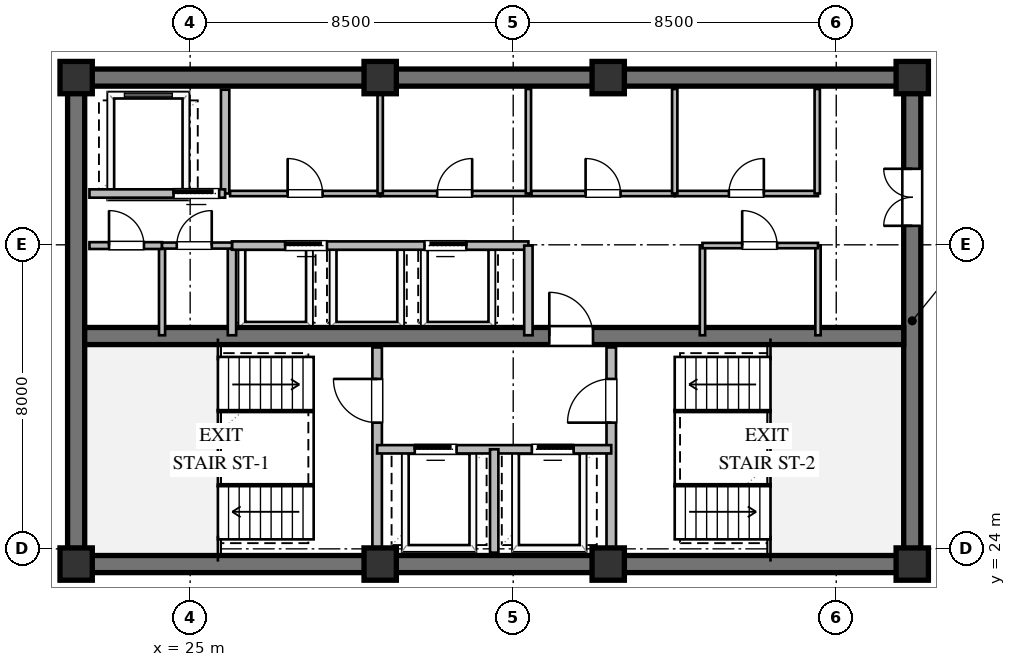
"""IFC4 building model, lengths in metres.
Left out: names, types, materials, properties, quantities, classifications, styles, units other than length and angle.
Written with IfcOpenShell. Run it as: python <this file> out.ifc"""

import sys

from ifc_helpers import new_model, si_unit, direction, frame, frame_2d, origin, origin_2d, place, context, subcontext, project, spatial, rectangle, extrude, element, fill, save


model = new_model("IFC4")
c1 = context("Model", 3, precision=1e-05, world=origin(), true_north=direction((0.0, 1.0)))
c2 = subcontext(c1, "Body", "Model", "MODEL_VIEW")
j1 = project(units=[si_unit("LENGTHUNIT", "METRE"), si_unit("PLANEANGLEUNIT", "RADIAN")], contexts=[c1])
p1 = place(None, origin())
s1 = spatial("IfcSite", under=j1, at=p1, CompositionType="ELEMENT")
p2 = place(p1, origin())
s2 = spatial("IfcBuilding", under=s1, at=p2, CompositionType="ELEMENT")
p3 = place(p2, frame((0.0, 0.0, 217.2)))
s3 = spatial("IfcBuildingStorey", under=s2, at=p3, CompositionType="ELEMENT", Elevation=217.2)
for number, where, z_axis, x_axis in (
    (1, (21.775, 23.6, 0.0), (0.0, 0.0, 1.0), (1.0, 0.0, 0.0)),
    (2, (21.775, 36.4, 0.0), (0.0, 0.0, 1.0), (1.0, 0.0, 0.0)),
):
    element("IfcWall", number, at=place(p3, frame(where, z_axis=z_axis, x_axis=x_axis)), inside=s3, PredefinedType="SHEAR", context=c2, shape_type="SweptSolid", body=[
        extrude(rectangle(XDim=22.45, YDim=0.45, at=frame_2d((11.225, 0.0))), origin(), (0.0, 0.0, 1.0), 3.36),
    ])
p4 = place(p3, frame((22.0, 23.825, 0.0), z_axis=(0.0, 0.0, 1.0), x_axis=(0.0, 1.0, 0.0)))
e3 = element("IfcWall", 3, at=p4, inside=s3, PredefinedType="SHEAR", context=c2, shape_type="SweptSolid", body=[
    extrude(rectangle(XDim=12.35, YDim=0.45, at=frame_2d((6.175, 0.0))), origin(), (0.0, 0.0, 1.0), 3.36),
])
p5 = place(p3, frame((44.0, 23.825, 0.0), z_axis=(0.0, 0.0, 1.0), x_axis=(0.0, 1.0, 0.0)))
e4 = element("IfcWall", 4, at=p5, inside=s3, PredefinedType="SHEAR", context=c2, shape_type="SweptSolid", body=[
    extrude(rectangle(XDim=12.35, YDim=0.45, at=frame_2d((6.175, 0.0))), origin(), (0.0, 0.0, 1.0), 3.36),
])
p6 = place(p5, frame((8.675, 0.0, 0.0)))
e5 = element("IfcOpeningElement", 5, at=p6, cuts=e4, PredefinedType="OPENING", context=c2, shape_type="SweptSolid", body=[
    extrude(rectangle(XDim=1.5, YDim=2.15, at=frame_2d((0.75, 1.075))), frame((0.0, 0.235, 0.0), z_axis=(0.0, -1.0, 0.0), x_axis=(1.0, 0.0, 0.0)), (0.0, 0.0, 1.0), 0.47),
])
p7 = place(p3, frame((22.225, 29.6, 0.0), z_axis=(0.0, 0.0, 1.0), x_axis=(1.0, 0.0, 0.0)))
e6 = element("IfcWall", 6, at=p7, inside=s3, PredefinedType="SHEAR", context=c2, shape_type="SweptSolid", body=[
    extrude(rectangle(XDim=21.55, YDim=0.45, at=frame_2d((10.775, 0.0))), origin(), (0.0, 0.0, 1.0), 3.36),
])
p8 = place(p7, frame((12.225, 0.0, 0.0)))
e7 = element("IfcOpeningElement", 7, at=p8, cuts=e6, PredefinedType="OPENING", context=c2, shape_type="SweptSolid", body=[
    extrude(rectangle(XDim=1.15, YDim=2.1, at=frame_2d((0.575, 1.05))), frame((0.0, 0.235, 0.0), z_axis=(0.0, -1.0, 0.0), x_axis=(1.0, 0.0, 0.0)), (0.0, 0.0, 1.0), 0.47),
])
for number, where, z_axis, x_axis in (
    (8, (22.0, 23.6, 0.0), (0.0, 0.0, 1.0), (1.0, 0.0, 0.0)),
    (9, (30.0, 23.6, 0.0), (0.0, 0.0, 1.0), (1.0, 0.0, 0.0)),
    (10, (36.0, 23.6, 0.0), (0.0, 0.0, 1.0), (1.0, 0.0, 0.0)),
    (11, (44.0, 23.6, 0.0), (0.0, 0.0, 1.0), (1.0, 0.0, 0.0)),
    (12, (44.0, 36.4, 0.0), (0.0, 0.0, 1.0), (1.0, 0.0, 0.0)),
    (13, (36.0, 36.4, 0.0), (0.0, 0.0, 1.0), (1.0, 0.0, 0.0)),
    (14, (30.0, 36.4, 0.0), (0.0, 0.0, 1.0), (1.0, 0.0, 0.0)),
    (15, (22.0, 36.4, 0.0), (0.0, 0.0, 1.0), (1.0, 0.0, 0.0)),
):
    element("IfcColumn", number, at=place(p3, frame(where, z_axis=z_axis, x_axis=x_axis)), inside=s3, PredefinedType="COLUMN", context=c2, shape_type="SweptSolid", body=[
        extrude(rectangle(XDim=0.85, YDim=0.85, at=origin_2d()), origin(), (0.0, 0.0, 1.0), 3.6),
    ])
p9 = place(p3, frame((29.92, 23.9, 0.0), z_axis=(0.0, 0.0, 1.0), x_axis=(0.0, 1.0, 0.0)))
e16 = element("IfcWall", 16, at=p9, inside=s3, PredefinedType="SOLIDWALL", context=c2, shape_type="SweptSolid", body=[
    extrude(rectangle(XDim=5.4, YDim=0.25, at=frame_2d((2.7, 0.0))), origin(), (0.0, 0.0, 1.0), 3.36),
])
p10 = place(p9, frame((3.421, 0.0, 0.0)))
e17 = element("IfcOpeningElement", 17, at=p10, cuts=e16, PredefinedType="OPENING", context=c2, shape_type="SweptSolid", body=[
    extrude(rectangle(XDim=1.15, YDim=2.1, at=frame_2d((0.575, 1.05))), frame((0.0, 0.135, 0.0), z_axis=(0.0, -1.0, 0.0), x_axis=(1.0, 0.0, 0.0)), (0.0, 0.0, 1.0), 0.27),
])
p11 = place(p3, frame((36.08, 23.9, 0.0), z_axis=(0.0, 0.0, 1.0), x_axis=(0.0, 1.0, 0.0)))
e18 = element("IfcWall", 18, at=p11, inside=s3, PredefinedType="SOLIDWALL", context=c2, shape_type="SweptSolid", body=[
    extrude(rectangle(XDim=5.4, YDim=0.25, at=frame_2d((2.7, 0.0))), origin(), (0.0, 0.0, 1.0), 3.36),
])
p12 = place(p11, frame((3.421, 0.0, 0.0)))
e19 = element("IfcOpeningElement", 19, at=p12, cuts=e18, PredefinedType="OPENING", context=c2, shape_type="SweptSolid", body=[
    extrude(rectangle(XDim=1.15, YDim=2.1, at=frame_2d((0.575, 1.05))), frame((0.0, 0.135, 0.0), z_axis=(0.0, -1.0, 0.0), x_axis=(1.0, 0.0, 0.0)), (0.0, 0.0, 1.0), 0.27),
])
p13 = place(p3, frame((29.92, 26.62, 0.0), z_axis=(0.0, 0.0, 1.0), x_axis=(1.0, 0.0, 0.0)))
e20 = element("IfcWall", 20, at=p13, inside=s3, PredefinedType="SOLIDWALL", context=c2, shape_type="SweptSolid", body=[
    extrude(rectangle(XDim=6.16, YDim=0.22, at=frame_2d((3.08, 0.0))), origin(), (0.0, 0.0, 1.0), 3.36),
])
p14 = place(p13, frame((0.99, 0.0, 0.0)))
e21 = element("IfcOpeningElement", 21, at=p14, cuts=e20, PredefinedType="OPENING", context=c2, shape_type="SweptSolid", body=[
    extrude(rectangle(XDim=1.1, YDim=2.1, at=frame_2d((0.55, 1.05))), frame((0.0, 0.12, 0.0), z_axis=(0.0, -1.0, 0.0), x_axis=(1.0, 0.0, 0.0)), (0.0, 0.0, 1.0), 0.24),
])
p15 = place(p13, frame((4.07, 0.0, 0.0)))
e22 = element("IfcOpeningElement", 22, at=p15, cuts=e20, PredefinedType="OPENING", context=c2, shape_type="SweptSolid", body=[
    extrude(rectangle(XDim=1.1, YDim=2.1, at=frame_2d((0.55, 1.05))), frame((0.0, 0.12, 0.0), z_axis=(0.0, -1.0, 0.0), x_axis=(1.0, 0.0, 0.0)), (0.0, 0.0, 1.0), 0.24),
])
p16 = place(p3, frame((33.0, 23.9, 0.0), z_axis=(0.0, 0.0, 1.0), x_axis=(0.0, 1.0, 0.0)))
e23 = element("IfcWall", 23, at=p16, inside=s3, PredefinedType="SOLIDWALL", context=c2, shape_type="SweptSolid", body=[
    extrude(rectangle(XDim=2.72, YDim=0.22, at=frame_2d((1.36, 0.0))), origin(), (0.0, 0.0, 1.0), 3.36),
])
p17 = place(p3, frame((25.92, 33.35, 0.0), z_axis=(0.0, 0.0, 1.0), x_axis=(0.0, 1.0, 0.0)))
e24 = element("IfcWall", 24, at=p17, inside=s3, PredefinedType="SOLIDWALL", context=c2, shape_type="SweptSolid", body=[
    extrude(rectangle(XDim=2.73, YDim=0.22, at=frame_2d((1.365, 0.0))), origin(), (0.0, 0.0, 1.0), 3.36),
])
p18 = place(p3, frame((22.35, 33.35, 0.0), z_axis=(0.0, 0.0, 1.0), x_axis=(1.0, 0.0, 0.0)))
e25 = element("IfcWall", 25, at=p18, inside=s3, PredefinedType="SOLIDWALL", context=c2, shape_type="SweptSolid", body=[
    extrude(rectangle(XDim=3.57, YDim=0.22, at=frame_2d((1.785, 0.0))), origin(), (0.0, 0.0, 1.0), 3.36),
])
p19 = place(p18, frame((2.213, 0.0, 0.0)))
e26 = element("IfcOpeningElement", 26, at=p19, cuts=e25, PredefinedType="OPENING", context=c2, shape_type="SweptSolid", body=[
    extrude(rectangle(XDim=1.2, YDim=2.1, at=frame_2d((0.6, 1.05))), frame((0.0, 0.12, 0.0), z_axis=(0.0, -1.0, 0.0), x_axis=(1.0, 0.0, 0.0)), (0.0, 0.0, 1.0), 0.24),
])
p20 = place(p3, frame((26.1, 29.62, 0.0), z_axis=(0.0, 0.0, 1.0), x_axis=(0.0, 1.0, 0.0)))
e27 = element("IfcWall", 27, at=p20, inside=s3, PredefinedType="SOLIDWALL", context=c2, shape_type="SweptSolid", body=[
    extrude(rectangle(XDim=2.36, YDim=0.22, at=frame_2d((1.18, 0.0))), origin(), (0.0, 0.0, 1.0), 3.36),
])
p21 = place(p3, frame((26.1, 31.98, 0.0), z_axis=(0.0, 0.0, 1.0), x_axis=(1.0, 0.0, 0.0)))
e28 = element("IfcWall", 28, at=p21, inside=s3, PredefinedType="SOLIDWALL", context=c2, shape_type="SweptSolid", body=[
    extrude(rectangle(XDim=7.8, YDim=0.22, at=frame_2d((3.9, 0.0))), origin(), (0.0, 0.0, 1.0), 3.36),
])
p22 = place(p21, frame((1.4, 0.0, 0.0)))
e29 = element("IfcOpeningElement", 29, at=p22, cuts=e28, PredefinedType="OPENING", context=c2, shape_type="SweptSolid", body=[
    extrude(rectangle(XDim=1.1, YDim=2.1, at=frame_2d((0.55, 1.05))), frame((0.0, 0.12, 0.0), z_axis=(0.0, -1.0, 0.0), x_axis=(1.0, 0.0, 0.0)), (0.0, 0.0, 1.0), 0.24),
])
p23 = place(p21, frame((5.066, 0.0, 0.0)))
e30 = element("IfcOpeningElement", 30, at=p23, cuts=e28, PredefinedType="OPENING", context=c2, shape_type="SweptSolid", body=[
    extrude(rectangle(XDim=1.1, YDim=2.1, at=frame_2d((0.55, 1.05))), frame((0.0, 0.12, 0.0), z_axis=(0.0, -1.0, 0.0), x_axis=(1.0, 0.0, 0.0)), (0.0, 0.0, 1.0), 0.24),
])
p24 = place(p3, frame((33.9, 29.62, 0.0), z_axis=(0.0, 0.0, 1.0), x_axis=(0.0, 1.0, 0.0)))
e31 = element("IfcWall", 31, at=p24, inside=s3, PredefinedType="SOLIDWALL", context=c2, shape_type="SweptSolid", body=[
    extrude(rectangle(XDim=2.36, YDim=0.22, at=frame_2d((1.18, 0.0))), origin(), (0.0, 0.0, 1.0), 3.36),
])
p25 = place(p3, frame((26.05, 33.35, 0.0), z_axis=(0.0, 0.0, 1.0), x_axis=(1.0, 0.0, 0.0)))
e32 = element("IfcWall", 32, at=p25, inside=s3, PredefinedType="PARTITIONING", context=c2, shape_type="SweptSolid", body=[
    extrude(rectangle(XDim=3.95, YDim=0.14, at=frame_2d((1.975, 0.0))), origin(), (0.0, 0.0, 1.0), 3.36),
])
p26 = place(p25, frame((1.515, 0.0, 0.0)))
e33 = element("IfcOpeningElement", 33, at=p26, cuts=e32, PredefinedType="OPENING", context=c2, shape_type="SweptSolid", body=[
    extrude(rectangle(XDim=0.92, YDim=2.1, at=frame_2d((0.46, 1.05))), frame((0.0, 0.08, 0.0), z_axis=(0.0, -1.0, 0.0), x_axis=(1.0, 0.0, 0.0)), (0.0, 0.0, 1.0), 0.16),
])
p27 = place(p3, frame((30.0, 33.35, 0.0), z_axis=(0.0, 0.0, 1.0), x_axis=(1.0, 0.0, 0.0)))
e34 = element("IfcWall", 34, at=p27, inside=s3, PredefinedType="PARTITIONING", context=c2, shape_type="SweptSolid", body=[
    extrude(rectangle(XDim=3.92, YDim=0.14, at=frame_2d((1.96, 0.0))), origin(), (0.0, 0.0, 1.0), 3.36),
])
p28 = place(p27, frame((1.5, 0.0, 0.0)))
e35 = element("IfcOpeningElement", 35, at=p28, cuts=e34, PredefinedType="OPENING", context=c2, shape_type="SweptSolid", body=[
    extrude(rectangle(XDim=0.92, YDim=2.1, at=frame_2d((0.46, 1.05))), frame((0.0, 0.08, 0.0), z_axis=(0.0, -1.0, 0.0), x_axis=(1.0, 0.0, 0.0)), (0.0, 0.0, 1.0), 0.16),
])
for number, where, z_axis, x_axis in (
    (36, (30.0, 33.35, 0.0), (0.0, 0.0, 1.0), (0.0, 1.0, 0.0)),
    (37, (33.9, 33.35, 0.0), (0.0, 0.0, 1.0), (0.0, 1.0, 0.0)),
):
    element("IfcWall", number, at=place(p3, frame(where, z_axis=z_axis, x_axis=x_axis)), inside=s3, PredefinedType="PARTITIONING", context=c2, shape_type="SweptSolid", body=[
        extrude(rectangle(XDim=2.75, YDim=0.14, at=frame_2d((1.375, 0.0))), origin(), (0.0, 0.0, 1.0), 3.36),
    ])
p29 = place(p3, frame((33.98, 33.35, 0.0), z_axis=(0.0, 0.0, 1.0), x_axis=(1.0, 0.0, 0.0)))
e38 = element("IfcWall", 38, at=p29, inside=s3, PredefinedType="PARTITIONING", context=c2, shape_type="SweptSolid", body=[
    extrude(rectangle(XDim=3.77, YDim=0.14, at=frame_2d((1.885, 0.0))), origin(), (0.0, 0.0, 1.0), 3.36),
])
p30 = place(p29, frame((1.425, 0.0, 0.0)))
e39 = element("IfcOpeningElement", 39, at=p30, cuts=e38, PredefinedType="OPENING", context=c2, shape_type="SweptSolid", body=[
    extrude(rectangle(XDim=0.92, YDim=2.1, at=frame_2d((0.46, 1.05))), frame((0.0, 0.08, 0.0), z_axis=(0.0, -1.0, 0.0), x_axis=(1.0, 0.0, 0.0)), (0.0, 0.0, 1.0), 0.16),
])
p31 = place(p3, frame((37.75, 33.35, 0.0), z_axis=(0.0, 0.0, 1.0), x_axis=(1.0, 0.0, 0.0)))
e40 = element("IfcWall", 40, at=p31, inside=s3, PredefinedType="PARTITIONING", context=c2, shape_type="SweptSolid", body=[
    extrude(rectangle(XDim=3.77, YDim=0.14, at=frame_2d((1.885, 0.0))), origin(), (0.0, 0.0, 1.0), 3.36),
])
p32 = place(p31, frame((1.425, 0.0, 0.0)))
e41 = element("IfcOpeningElement", 41, at=p32, cuts=e40, PredefinedType="OPENING", context=c2, shape_type="SweptSolid", body=[
    extrude(rectangle(XDim=0.92, YDim=2.1, at=frame_2d((0.46, 1.05))), frame((0.0, 0.08, 0.0), z_axis=(0.0, -1.0, 0.0), x_axis=(1.0, 0.0, 0.0)), (0.0, 0.0, 1.0), 0.16),
])
for number, where, z_axis, x_axis in (
    (42, (37.75, 33.35, 0.0), (0.0, 0.0, 1.0), (0.0, 1.0, 0.0)),
    (43, (41.5, 33.35, 0.0), (0.0, 0.0, 1.0), (0.0, 1.0, 0.0)),
):
    element("IfcWall", number, at=place(p3, frame(where, z_axis=z_axis, x_axis=x_axis)), inside=s3, PredefinedType="PARTITIONING", context=c2, shape_type="SweptSolid", body=[
        extrude(rectangle(XDim=2.75, YDim=0.14, at=frame_2d((1.375, 0.0))), origin(), (0.0, 0.0, 1.0), 3.36),
    ])
p33 = place(p3, frame((24.26, 29.62, 0.0), z_axis=(0.0, 0.0, 1.0), x_axis=(0.0, 1.0, 0.0)))
e44 = element("IfcWall", 44, at=p33, inside=s3, PredefinedType="PLUMBINGWALL", context=c2, shape_type="SweptSolid", body=[
    extrude(rectangle(XDim=2.36, YDim=0.16, at=frame_2d((1.18, 0.0))), origin(), (0.0, 0.0, 1.0), 3.36),
])
p34 = place(p3, frame((22.35, 31.98, 0.0), z_axis=(0.0, 0.0, 1.0), x_axis=(1.0, 0.0, 0.0)))
e45 = element("IfcWall", 45, at=p34, inside=s3, PredefinedType="PARTITIONING", context=c2, shape_type="SweptSolid", body=[
    extrude(rectangle(XDim=1.91, YDim=0.18, at=frame_2d((0.955, 0.0))), origin(), (0.0, 0.0, 1.0), 3.36),
])
p35 = place(p34, frame((0.515, 0.0, 0.0)))
e46 = element("IfcOpeningElement", 46, at=p35, cuts=e45, PredefinedType="OPENING", context=c2, shape_type="SweptSolid", body=[
    extrude(rectangle(XDim=0.92, YDim=2.1, at=frame_2d((0.46, 1.05))), frame((0.0, 0.1, 0.0), z_axis=(0.0, -1.0, 0.0), x_axis=(1.0, 0.0, 0.0)), (0.0, 0.0, 1.0), 0.2),
])
p36 = place(p3, frame((24.26, 31.98, 0.0), z_axis=(0.0, 0.0, 1.0), x_axis=(1.0, 0.0, 0.0)))
e47 = element("IfcWall", 47, at=p36, inside=s3, PredefinedType="PLUMBINGWALL", context=c2, shape_type="SweptSolid", body=[
    extrude(rectangle(XDim=1.84, YDim=0.16, at=frame_2d((0.92, 0.0))), origin(), (0.0, 0.0, 1.0), 3.36),
])
p37 = place(p36, frame((0.388, 0.0, 0.0)))
e48 = element("IfcOpeningElement", 48, at=p37, cuts=e47, PredefinedType="OPENING", context=c2, shape_type="SweptSolid", body=[
    extrude(rectangle(XDim=0.92, YDim=2.1, at=frame_2d((0.46, 1.05))), frame((0.0, 0.09, 0.0), z_axis=(0.0, -1.0, 0.0), x_axis=(1.0, 0.0, 0.0)), (0.0, 0.0, 1.0), 0.18),
])
for number, where, z_axis, x_axis in (
    (49, (38.48, 29.62, 0.0), (0.0, 0.0, 1.0), (0.0, 1.0, 0.0)),
    (50, (41.52, 29.62, 0.0), (0.0, 0.0, 1.0), (0.0, 1.0, 0.0)),
):
    element("IfcWall", number, at=place(p3, frame(where, z_axis=z_axis, x_axis=x_axis)), inside=s3, PredefinedType="PARTITIONING", context=c2, shape_type="SweptSolid", body=[
        extrude(rectangle(XDim=2.36, YDim=0.14, at=frame_2d((1.18, 0.0))), origin(), (0.0, 0.0, 1.0), 3.36),
    ])
p38 = place(p3, frame((38.48, 31.98, 0.0), z_axis=(0.0, 0.0, 1.0), x_axis=(1.0, 0.0, 0.0)))
e51 = element("IfcWall", 51, at=p38, inside=s3, PredefinedType="PARTITIONING", context=c2, shape_type="SweptSolid", body=[
    extrude(rectangle(XDim=3.04, YDim=0.14, at=frame_2d((1.52, 0.0))), origin(), (0.0, 0.0, 1.0), 3.36),
])
p39 = place(p38, frame((1.045, 0.0, 0.0)))
e52 = element("IfcOpeningElement", 52, at=p39, cuts=e51, PredefinedType="OPENING", context=c2, shape_type="SweptSolid", body=[
    extrude(rectangle(XDim=0.92, YDim=2.1, at=frame_2d((0.46, 1.05))), frame((0.0, 0.08, 0.0), z_axis=(0.0, -1.0, 0.0), x_axis=(1.0, 0.0, 0.0)), (0.0, 0.0, 1.0), 0.16),
])
p40 = place(p10, origin())
e53 = element("IfcDoor", 53, at=p40, inside=s3, OperationType="SINGLE_SWING_RIGHT", PredefinedType="DOOR", context=c2, shape_type="SweptSolid", body=[
    extrude(rectangle(XDim=1.15, YDim=2.1, at=frame_2d((0.575, 1.05))), frame((0.0, 0.025, 0.0), z_axis=(0.0, -1.0, 0.0), x_axis=(1.0, 0.0, 0.0)), (0.0, 0.0, 1.0), 0.05),
])
fill(e17, e53)
p41 = place(p12, origin())
e54 = element("IfcDoor", 54, at=p41, inside=s3, OperationType="SINGLE_SWING_LEFT", PredefinedType="DOOR", context=c2, shape_type="SweptSolid", body=[
    extrude(rectangle(XDim=1.15, YDim=2.1, at=frame_2d((0.575, 1.05))), frame((0.0, 0.025, 0.0), z_axis=(0.0, -1.0, 0.0), x_axis=(1.0, 0.0, 0.0)), (0.0, 0.0, 1.0), 0.05),
])
fill(e19, e54)
p42 = place(p14, origin())
e55 = element("IfcDoor", 55, at=p42, inside=s3, OperationType="SLIDING_TO_LEFT", PredefinedType="DOOR", context=c2, shape_type="SweptSolid", body=[
    extrude(rectangle(XDim=1.1, YDim=2.1, at=frame_2d((0.55, 1.05))), frame((0.0, 0.025, 0.0), z_axis=(0.0, -1.0, 0.0), x_axis=(1.0, 0.0, 0.0)), (0.0, 0.0, 1.0), 0.05),
])
fill(e21, e55)
p43 = place(p15, origin())
e56 = element("IfcDoor", 56, at=p43, inside=s3, OperationType="SLIDING_TO_RIGHT", PredefinedType="DOOR", context=c2, shape_type="SweptSolid", body=[
    extrude(rectangle(XDim=1.1, YDim=2.1, at=frame_2d((0.55, 1.05))), frame((0.0, 0.025, 0.0), z_axis=(0.0, -1.0, 0.0), x_axis=(1.0, 0.0, 0.0)), (0.0, 0.0, 1.0), 0.05),
])
fill(e22, e56)
p44 = place(p8, origin())
e57 = element("IfcDoor", 57, at=p44, inside=s3, OperationType="SINGLE_SWING_LEFT", PredefinedType="DOOR", context=c2, shape_type="SweptSolid", body=[
    extrude(rectangle(XDim=1.15, YDim=2.1, at=frame_2d((0.575, 1.05))), frame((0.0, 0.025, 0.0), z_axis=(0.0, -1.0, 0.0), x_axis=(1.0, 0.0, 0.0)), (0.0, 0.0, 1.0), 0.05),
])
fill(e7, e57)
p45 = place(p6, origin())
e58 = element("IfcDoor", 58, at=p45, inside=s3, OperationType="DOUBLE_DOOR_SINGLE_SWING", PredefinedType="DOOR", context=c2, shape_type="SweptSolid", body=[
    extrude(rectangle(XDim=1.5, YDim=2.15, at=frame_2d((0.75, 1.075))), frame((0.0, 0.025, 0.0), z_axis=(0.0, -1.0, 0.0), x_axis=(1.0, 0.0, 0.0)), (0.0, 0.0, 1.0), 0.05),
])
fill(e5, e58)
p46 = place(p19, origin())
e59 = element("IfcDoor", 59, at=p46, inside=s3, OperationType="SLIDING_TO_LEFT", PredefinedType="DOOR", context=c2, shape_type="SweptSolid", body=[
    extrude(rectangle(XDim=1.2, YDim=2.1, at=frame_2d((0.6, 1.05))), frame((0.0, 0.025, 0.0), z_axis=(0.0, -1.0, 0.0), x_axis=(1.0, 0.0, 0.0)), (0.0, 0.0, 1.0), 0.05),
])
fill(e26, e59)
p47 = place(p22, origin())
e60 = element("IfcDoor", 60, at=p47, inside=s3, OperationType="SLIDING_TO_LEFT", PredefinedType="DOOR", context=c2, shape_type="SweptSolid", body=[
    extrude(rectangle(XDim=1.1, YDim=2.1, at=frame_2d((0.55, 1.05))), frame((0.0, 0.025, 0.0), z_axis=(0.0, -1.0, 0.0), x_axis=(1.0, 0.0, 0.0)), (0.0, 0.0, 1.0), 0.05),
])
fill(e29, e60)
p48 = place(p23, origin())
e61 = element("IfcDoor", 61, at=p48, inside=s3, OperationType="SLIDING_TO_RIGHT", PredefinedType="DOOR", context=c2, shape_type="SweptSolid", body=[
    extrude(rectangle(XDim=1.1, YDim=2.1, at=frame_2d((0.55, 1.05))), frame((0.0, 0.025, 0.0), z_axis=(0.0, -1.0, 0.0), x_axis=(1.0, 0.0, 0.0)), (0.0, 0.0, 1.0), 0.05),
])
fill(e30, e61)
p49 = place(p26, origin())
e62 = element("IfcDoor", 62, at=p49, inside=s3, OperationType="SINGLE_SWING_LEFT", PredefinedType="DOOR", context=c2, shape_type="SweptSolid", body=[
    extrude(rectangle(XDim=0.92, YDim=2.1, at=frame_2d((0.46, 1.05))), frame((0.0, 0.025, 0.0), z_axis=(0.0, -1.0, 0.0), x_axis=(1.0, 0.0, 0.0)), (0.0, 0.0, 1.0), 0.05),
])
fill(e33, e62)
p50 = place(p28, origin())
e63 = element("IfcDoor", 63, at=p50, inside=s3, OperationType="SINGLE_SWING_RIGHT", PredefinedType="DOOR", context=c2, shape_type="SweptSolid", body=[
    extrude(rectangle(XDim=0.92, YDim=2.1, at=frame_2d((0.46, 1.05))), frame((0.0, 0.025, 0.0), z_axis=(0.0, -1.0, 0.0), x_axis=(1.0, 0.0, 0.0)), (0.0, 0.0, 1.0), 0.05),
])
fill(e35, e63)
p51 = place(p30, origin())
e64 = element("IfcDoor", 64, at=p51, inside=s3, OperationType="SINGLE_SWING_LEFT", PredefinedType="DOOR", context=c2, shape_type="SweptSolid", body=[
    extrude(rectangle(XDim=0.92, YDim=2.1, at=frame_2d((0.46, 1.05))), frame((0.0, 0.025, 0.0), z_axis=(0.0, -1.0, 0.0), x_axis=(1.0, 0.0, 0.0)), (0.0, 0.0, 1.0), 0.05),
])
fill(e39, e64)
p52 = place(p32, origin())
e65 = element("IfcDoor", 65, at=p52, inside=s3, OperationType="SINGLE_SWING_RIGHT", PredefinedType="DOOR", context=c2, shape_type="SweptSolid", body=[
    extrude(rectangle(XDim=0.92, YDim=2.1, at=frame_2d((0.46, 1.05))), frame((0.0, 0.025, 0.0), z_axis=(0.0, -1.0, 0.0), x_axis=(1.0, 0.0, 0.0)), (0.0, 0.0, 1.0), 0.05),
])
fill(e41, e65)
p53 = place(p35, origin())
e66 = element("IfcDoor", 66, at=p53, inside=s3, OperationType="SINGLE_SWING_LEFT", PredefinedType="DOOR", context=c2, shape_type="SweptSolid", body=[
    extrude(rectangle(XDim=0.92, YDim=2.1, at=frame_2d((0.46, 1.05))), frame((0.0, 0.025, 0.0), z_axis=(0.0, -1.0, 0.0), x_axis=(1.0, 0.0, 0.0)), (0.0, 0.0, 1.0), 0.05),
])
fill(e46, e66)
p54 = place(p37, origin())
e67 = element("IfcDoor", 67, at=p54, inside=s3, OperationType="SINGLE_SWING_RIGHT", PredefinedType="DOOR", context=c2, shape_type="SweptSolid", body=[
    extrude(rectangle(XDim=0.92, YDim=2.1, at=frame_2d((0.46, 1.05))), frame((0.0, 0.025, 0.0), z_axis=(0.0, -1.0, 0.0), x_axis=(1.0, 0.0, 0.0)), (0.0, 0.0, 1.0), 0.05),
])
fill(e48, e67)
p55 = place(p39, origin())
e68 = element("IfcDoor", 68, at=p55, inside=s3, OperationType="SINGLE_SWING_LEFT", PredefinedType="DOOR", context=c2, shape_type="SweptSolid", body=[
    extrude(rectangle(XDim=0.92, YDim=2.1, at=frame_2d((0.46, 1.05))), frame((0.0, 0.025, 0.0), z_axis=(0.0, -1.0, 0.0), x_axis=(1.0, 0.0, 0.0)), (0.0, 0.0, 1.0), 0.05),
])
fill(e52, e68)
save(model, sys.argv[1])
